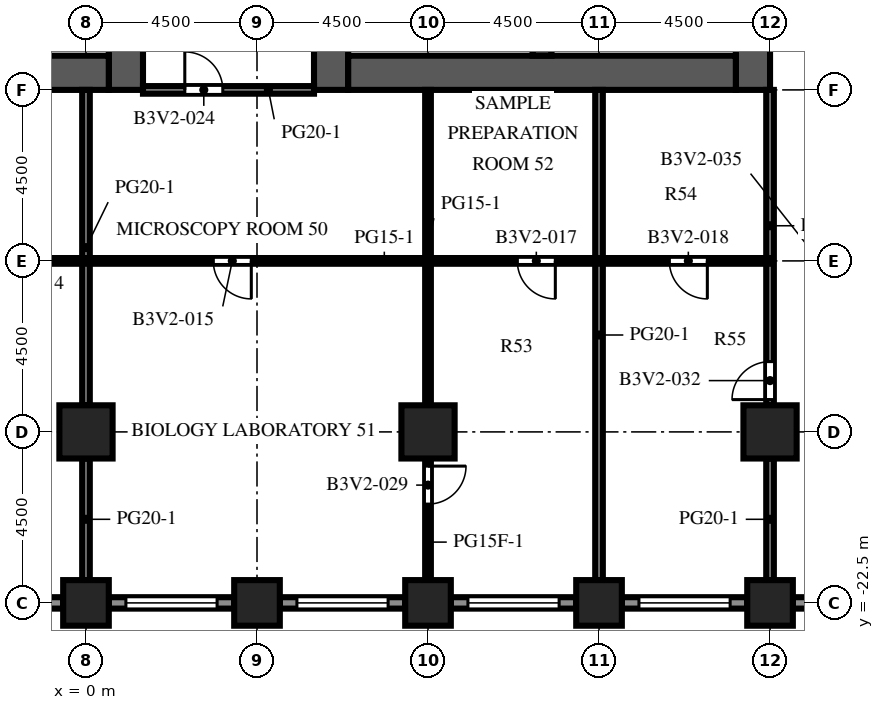
"""IFC4 building model, lengths in metres.
Left out: names, types, materials, properties, quantities, classifications, styles, units other than length and angle.
Written with IfcOpenShell. Run it as: python <this file> out.ifc"""

import sys

from ifc_helpers import new_model, si_unit, direction, frame, frame_2d, origin, origin_2d, place, context, subcontext, project, spatial, rectangle, extrude, element, fill, save


model = new_model("IFC4")
c1 = context("Model", 3, precision=1e-05, world=origin(), true_north=direction((0.0, 1.0)))
c2 = subcontext(c1, "Body", "Model", "MODEL_VIEW")
j1 = project(units=[si_unit("LENGTHUNIT", "METRE"), si_unit("PLANEANGLEUNIT", "RADIAN")], contexts=[c1])
p1 = place(None, origin())
s1 = spatial("IfcSite", under=j1, at=p1, CompositionType="ELEMENT")
p2 = place(p1, origin())
s2 = spatial("IfcBuilding", under=s1, at=p2, CompositionType="ELEMENT")
p3 = place(p2, frame((0.0, 0.0, 102.5)))
s3 = spatial("IfcBuildingStorey", under=s2, at=p3, CompositionType="ELEMENT", Elevation=102.5)
for number, where, z_axis, x_axis in (
    (1, (0.0, -22.5, 0.0), (0.0, 0.0, 1.0), (1.0, 0.0, 0.0)),
    (2, (4.5, -22.5, 0.0), (0.0, 0.0, 1.0), (1.0, 0.0, 0.0)),
    (3, (9.0, -22.5, 0.0), (0.0, 0.0, 1.0), (1.0, 0.0, 0.0)),
    (4, (13.5, -22.5, 0.0), (0.0, 0.0, 1.0), (1.0, 0.0, 0.0)),
    (5, (18.0, -22.5, 0.0), (0.0, 0.0, 1.0), (1.0, 0.0, 0.0)),
):
    element("IfcColumn", number, at=place(p3, frame(where, z_axis=z_axis, x_axis=x_axis)), inside=s3, PredefinedType="COLUMN", context=c2, shape_type="SweptSolid", body=[
        extrude(rectangle(XDim=1.2, YDim=1.2, at=origin_2d()), origin(), (0.0, 0.0, 1.0), 4.1),
    ])
for number, where, z_axis, x_axis in (
    (6, (0.0, -18.0, 0.0), (0.0, 0.0, 1.0), (1.0, 0.0, 0.0)),
    (7, (9.0, -18.0, 0.0), (0.0, 0.0, 1.0), (1.0, 0.0, 0.0)),
    (8, (18.0, -18.0, 0.0), (0.0, 0.0, 1.0), (1.0, 0.0, 0.0)),
):
    element("IfcColumn", number, at=place(p3, frame(where, z_axis=z_axis, x_axis=x_axis)), inside=s3, PredefinedType="COLUMN", context=c2, shape_type="SweptSolid", body=[
        extrude(rectangle(XDim=1.4, YDim=1.4, at=origin_2d()), origin(), (0.0, 0.0, 1.0), 4.1),
    ])
p4 = place(p3, frame((1.05, -9.0, 0.0), z_axis=(0.0, 0.0, 1.0), x_axis=(0.0, 1.0, 0.0)))
e9 = element("IfcWall", 9, at=p4, inside=s3, PredefinedType="SHEAR", context=c2, shape_type="SweptSolid", body=[
    extrude(rectangle(XDim=27.5, YDim=0.9, at=frame_2d((13.75, 0.0))), origin(), (0.0, 0.0, 1.0), 4.1),
])
p5 = place(p4, frame((12.55, 0.0, 0.0)))
e10 = element("IfcOpeningElement", 10, at=p5, cuts=e9, PredefinedType="OPENING", context=c2, shape_type="SweptSolid", body=[
    extrude(rectangle(XDim=2.4, YDim=2.4, at=frame_2d((1.2, 1.2))), frame((0.0, 0.46, 0.0), z_axis=(0.0, -1.0, 0.0), x_axis=(1.0, 0.0, 0.0)), (0.0, 0.0, 1.0), 0.92),
])
p6 = place(p4, frame((3.893, 0.0, 0.0)))
e11 = element("IfcOpeningElement", 11, at=p6, cuts=e9, PredefinedType="OPENING", context=c2, shape_type="SweptSolid", body=[
    extrude(rectangle(XDim=0.923, YDim=2.1, at=frame_2d((0.461, 1.05))), frame((0.0, 0.46, 0.0), z_axis=(0.0, -1.0, 0.0), x_axis=(1.0, 0.0, 0.0)), (0.0, 0.0, 1.0), 0.92),
])
p7 = place(p4, frame((23.427, 0.0, 0.0)))
e12 = element("IfcOpeningElement", 12, at=p7, cuts=e9, PredefinedType="OPENING", context=c2, shape_type="SweptSolid", body=[
    extrude(rectangle(XDim=1.2, YDim=2.1, at=frame_2d((0.6, 1.05))), frame((0.0, 0.46, 0.0), z_axis=(0.0, -1.0, 0.0), x_axis=(1.0, 0.0, 0.0)), (0.0, 0.0, 1.0), 0.92),
])
p8 = place(p3, frame((-9.6, -8.55, 0.0), z_axis=(0.0, 0.0, 1.0), x_axis=(1.0, 0.0, 0.0)))
e13 = element("IfcWall", 13, at=p8, inside=s3, PredefinedType="SHEAR", context=c2, shape_type="SweptSolid", body=[
    extrude(rectangle(XDim=10.2, YDim=0.9, at=frame_2d((5.1, 0.0))), origin(), (0.0, 0.0, 1.0), 4.1),
])
p9 = place(p3, frame((6.45, -9.0, 0.0), z_axis=(0.0, 0.0, 1.0), x_axis=(0.0, 1.0, 0.0)))
e14 = element("IfcWall", 14, at=p9, inside=s3, PredefinedType="SHEAR", context=c2, shape_type="SweptSolid", body=[
    extrude(rectangle(XDim=27.5, YDim=0.9, at=frame_2d((13.75, 0.0))), origin(), (0.0, 0.0, 1.0), 4.1),
])
p10 = place(p9, frame((12.55, 0.0, 0.0)))
e15 = element("IfcOpeningElement", 15, at=p10, cuts=e14, PredefinedType="OPENING", context=c2, shape_type="SweptSolid", body=[
    extrude(rectangle(XDim=2.4, YDim=2.4, at=frame_2d((1.2, 1.2))), frame((0.0, 0.46, 0.0), z_axis=(0.0, -1.0, 0.0), x_axis=(1.0, 0.0, 0.0)), (0.0, 0.0, 1.0), 0.92),
])
p11 = place(p9, frame((3.893, 0.0, 0.0)))
e16 = element("IfcOpeningElement", 16, at=p11, cuts=e14, PredefinedType="OPENING", context=c2, shape_type="SweptSolid", body=[
    extrude(rectangle(XDim=0.923, YDim=2.1, at=frame_2d((0.461, 1.05))), frame((0.0, 0.46, 0.0), z_axis=(0.0, -1.0, 0.0), x_axis=(1.0, 0.0, 0.0)), (0.0, 0.0, 1.0), 0.92),
])
p12 = place(p9, frame((23.427, 0.0, 0.0)))
e17 = element("IfcOpeningElement", 17, at=p12, cuts=e14, PredefinedType="OPENING", context=c2, shape_type="SweptSolid", body=[
    extrude(rectangle(XDim=1.2, YDim=2.1, at=frame_2d((0.6, 1.05))), frame((0.0, 0.46, 0.0), z_axis=(0.0, -1.0, 0.0), x_axis=(1.0, 0.0, 0.0)), (0.0, 0.0, 1.0), 0.92),
])
p13 = place(p3, frame((17.55, -9.0, 0.0), z_axis=(0.0, 0.0, 1.0), x_axis=(0.0, 1.0, 0.0)))
e18 = element("IfcWall", 18, at=p13, inside=s3, PredefinedType="SHEAR", context=c2, shape_type="SweptSolid", body=[
    extrude(rectangle(XDim=27.5, YDim=0.9, at=frame_2d((13.75, 0.0))), origin(), (0.0, 0.0, 1.0), 4.1),
])
p14 = place(p13, frame((12.55, 0.0, 0.0)))
e19 = element("IfcOpeningElement", 19, at=p14, cuts=e18, PredefinedType="OPENING", context=c2, shape_type="SweptSolid", body=[
    extrude(rectangle(XDim=2.4, YDim=2.4, at=frame_2d((1.2, 1.2))), frame((0.0, 0.46, 0.0), z_axis=(0.0, -1.0, 0.0), x_axis=(1.0, 0.0, 0.0)), (0.0, 0.0, 1.0), 0.92),
])
p15 = place(p13, frame((6.825, 0.0, 0.0)))
e20 = element("IfcOpeningElement", 20, at=p15, cuts=e18, PredefinedType="OPENING", context=c2, shape_type="SweptSolid", body=[
    extrude(rectangle(XDim=1.2, YDim=2.1, at=frame_2d((0.6, 1.05))), frame((0.0, 0.46, 0.0), z_axis=(0.0, -1.0, 0.0), x_axis=(1.0, 0.0, 0.0)), (0.0, 0.0, 1.0), 0.92),
])
p16 = place(p13, frame((19.475, 0.0, 0.0)))
e21 = element("IfcOpeningElement", 21, at=p16, cuts=e18, PredefinedType="OPENING", context=c2, shape_type="SweptSolid", body=[
    extrude(rectangle(XDim=1.2, YDim=2.1, at=frame_2d((0.6, 1.05))), frame((0.0, 0.46, 0.0), z_axis=(0.0, -1.0, 0.0), x_axis=(1.0, 0.0, 0.0)), (0.0, 0.0, 1.0), 0.92),
])
p17 = place(p3, frame((6.9, -8.55, 0.0), z_axis=(0.0, 0.0, 1.0), x_axis=(1.0, 0.0, 0.0)))
e22 = element("IfcWall", 22, at=p17, inside=s3, PredefinedType="SHEAR", context=c2, shape_type="SweptSolid", body=[
    extrude(rectangle(XDim=10.2, YDim=0.9, at=frame_2d((5.1, 0.0))), origin(), (0.0, 0.0, 1.0), 4.1),
])
p18 = place(p3, frame((12.0, -8.1, 0.0), z_axis=(0.0, 0.0, 1.0), x_axis=(0.0, 1.0, 0.0)))
e23 = element("IfcWall", 23, at=p18, inside=s3, PredefinedType="SHEAR", context=c2, shape_type="SweptSolid", body=[
    extrude(rectangle(XDim=7.35, YDim=0.5, at=frame_2d((3.675, 0.0))), origin(), (0.0, 0.0, 1.0), 4.1),
])
p19 = place(p3, frame((-0.6, -22.5, 0.0), z_axis=(0.0, 0.0, 1.0), x_axis=(-1.0, 0.0, 0.0)))
e24 = element("IfcWall", 24, at=p19, inside=s3, PredefinedType="SOLIDWALL", context=c2, shape_type="SweptSolid", body=[
    extrude(rectangle(XDim=3.3, YDim=0.3, at=frame_2d((1.65, 0.0))), origin(), (0.0, 0.0, 1.0), 2.75),
])
p20 = place(p19, frame((0.45, 0.0, 0.8)))
e25 = element("IfcOpeningElement", 25, at=p20, cuts=e24, PredefinedType="OPENING", context=c2, shape_type="SweptSolid", body=[
    extrude(rectangle(XDim=2.4, YDim=1.7, at=frame_2d((1.2, 0.85))), frame((0.0, 0.16, 0.0), z_axis=(0.0, -1.0, 0.0), x_axis=(1.0, 0.0, 0.0)), (0.0, 0.0, 1.0), 0.32),
])
p21 = place(p3, frame((3.9, -22.5, 0.0), z_axis=(0.0, 0.0, 1.0), x_axis=(-1.0, 0.0, 0.0)))
e26 = element("IfcWall", 26, at=p21, inside=s3, PredefinedType="SOLIDWALL", context=c2, shape_type="SweptSolid", body=[
    extrude(rectangle(XDim=3.3, YDim=0.3, at=frame_2d((1.65, 0.0))), origin(), (0.0, 0.0, 1.0), 2.75),
])
p22 = place(p21, frame((0.45, 0.0, 0.8)))
e27 = element("IfcOpeningElement", 27, at=p22, cuts=e26, PredefinedType="OPENING", context=c2, shape_type="SweptSolid", body=[
    extrude(rectangle(XDim=2.4, YDim=1.7, at=frame_2d((1.2, 0.85))), frame((0.0, 0.16, 0.0), z_axis=(0.0, -1.0, 0.0), x_axis=(1.0, 0.0, 0.0)), (0.0, 0.0, 1.0), 0.32),
])
p23 = place(p3, frame((8.4, -22.5, 0.0), z_axis=(0.0, 0.0, 1.0), x_axis=(-1.0, 0.0, 0.0)))
e28 = element("IfcWall", 28, at=p23, inside=s3, PredefinedType="SOLIDWALL", context=c2, shape_type="SweptSolid", body=[
    extrude(rectangle(XDim=3.3, YDim=0.3, at=frame_2d((1.65, 0.0))), origin(), (0.0, 0.0, 1.0), 2.75),
])
p24 = place(p23, frame((0.45, 0.0, 0.8)))
e29 = element("IfcOpeningElement", 29, at=p24, cuts=e28, PredefinedType="OPENING", context=c2, shape_type="SweptSolid", body=[
    extrude(rectangle(XDim=2.4, YDim=1.7, at=frame_2d((1.2, 0.85))), frame((0.0, 0.16, 0.0), z_axis=(0.0, -1.0, 0.0), x_axis=(1.0, 0.0, 0.0)), (0.0, 0.0, 1.0), 0.32),
])
p25 = place(p3, frame((12.9, -22.5, 0.0), z_axis=(0.0, 0.0, 1.0), x_axis=(-1.0, 0.0, 0.0)))
e30 = element("IfcWall", 30, at=p25, inside=s3, PredefinedType="SOLIDWALL", context=c2, shape_type="SweptSolid", body=[
    extrude(rectangle(XDim=3.3, YDim=0.3, at=frame_2d((1.65, 0.0))), origin(), (0.0, 0.0, 1.0), 2.75),
])
p26 = place(p25, frame((0.45, 0.0, 0.8)))
e31 = element("IfcOpeningElement", 31, at=p26, cuts=e30, PredefinedType="OPENING", context=c2, shape_type="SweptSolid", body=[
    extrude(rectangle(XDim=2.4, YDim=1.7, at=frame_2d((1.2, 0.85))), frame((0.0, 0.16, 0.0), z_axis=(0.0, -1.0, 0.0), x_axis=(1.0, 0.0, 0.0)), (0.0, 0.0, 1.0), 0.32),
])
p27 = place(p3, frame((17.4, -22.5, 0.0), z_axis=(0.0, 0.0, 1.0), x_axis=(-1.0, 0.0, 0.0)))
e32 = element("IfcWall", 32, at=p27, inside=s3, PredefinedType="SOLIDWALL", context=c2, shape_type="SweptSolid", body=[
    extrude(rectangle(XDim=3.3, YDim=0.3, at=frame_2d((1.65, 0.0))), origin(), (0.0, 0.0, 1.0), 2.75),
])
p28 = place(p27, frame((0.45, 0.0, 0.8)))
e33 = element("IfcOpeningElement", 33, at=p28, cuts=e32, PredefinedType="OPENING", context=c2, shape_type="SweptSolid", body=[
    extrude(rectangle(XDim=2.4, YDim=1.7, at=frame_2d((1.2, 0.85))), frame((0.0, 0.16, 0.0), z_axis=(0.0, -1.0, 0.0), x_axis=(1.0, 0.0, 0.0)), (0.0, 0.0, 1.0), 0.32),
])
p29 = place(p3, frame((21.9, -22.5, 0.0), z_axis=(0.0, 0.0, 1.0), x_axis=(-1.0, 0.0, 0.0)))
e34 = element("IfcWall", 34, at=p29, inside=s3, PredefinedType="SOLIDWALL", context=c2, shape_type="SweptSolid", body=[
    extrude(rectangle(XDim=3.3, YDim=0.3, at=frame_2d((1.65, 0.0))), origin(), (0.0, 0.0, 1.0), 2.75),
])
p30 = place(p29, frame((1.15, 0.0, 0.0)))
e35 = element("IfcOpeningElement", 35, at=p30, cuts=e34, PredefinedType="OPENING", context=c2, shape_type="SweptSolid", body=[
    extrude(rectangle(XDim=1.0, YDim=2.2, at=frame_2d((0.5, 1.1))), frame((0.0, 0.16, 0.0), z_axis=(0.0, -1.0, 0.0), x_axis=(1.0, 0.0, 0.0)), (0.0, 0.0, 1.0), 0.32),
])
p31 = place(p3, frame((0.0, -21.9, 0.0), z_axis=(0.0, 0.0, 1.0), x_axis=(0.0, 1.0, 0.0)))
e36 = element("IfcWall", 36, at=p31, inside=s3, PredefinedType="PARTITIONING", context=c2, shape_type="SweptSolid", body=[
    extrude(rectangle(XDim=3.2, YDim=0.2, at=frame_2d((1.6, 0.0))), origin(), (0.0, 0.0, 1.0), 3.65),
])
p32 = place(p3, frame((0.0, -17.3, 0.0), z_axis=(0.0, 0.0, 1.0), x_axis=(0.0, 1.0, 0.0)))
e37 = element("IfcWall", 37, at=p32, inside=s3, PredefinedType="PARTITIONING", context=c2, shape_type="SweptSolid", body=[
    extrude(rectangle(XDim=8.3, YDim=0.2, at=frame_2d((4.15, 0.0))), origin(), (0.0, 0.0, 1.0), 3.65),
])
p33 = place(p3, frame((9.0, -18.7, 0.0), z_axis=(0.0, 0.0, 1.0), x_axis=(0.0, -1.0, 0.0)))
e38 = element("IfcWall", 38, at=p33, inside=s3, PredefinedType="PARTITIONING", context=c2, shape_type="SweptSolid", body=[
    extrude(rectangle(XDim=3.2, YDim=0.15, at=frame_2d((1.6, 0.0))), origin(), (0.0, 0.0, 1.0), 3.65),
])
p34 = place(p33, frame((0.2, 0.0, 0.0)))
e39 = element("IfcOpeningElement", 39, at=p34, cuts=e38, PredefinedType="OPENING", context=c2, shape_type="SweptSolid", body=[
    extrude(rectangle(XDim=1.0, YDim=2.1, at=frame_2d((0.5, 1.05))), frame((0.0, 0.085, 0.0), z_axis=(0.0, -1.0, 0.0), x_axis=(1.0, 0.0, 0.0)), (0.0, 0.0, 1.0), 0.17),
])
p35 = place(p3, frame((9.0, -17.3, 0.0), z_axis=(0.0, 0.0, 1.0), x_axis=(0.0, 1.0, 0.0)))
e40 = element("IfcWall", 40, at=p35, inside=s3, PredefinedType="PARTITIONING", context=c2, shape_type="SweptSolid", body=[
    extrude(rectangle(XDim=8.3, YDim=0.15, at=frame_2d((4.15, 0.0))), origin(), (0.0, 0.0, 1.0), 3.65),
])
p36 = place(p3, frame((13.5, -21.9, 0.0), z_axis=(0.0, 0.0, 1.0), x_axis=(0.0, 1.0, 0.0)))
e41 = element("IfcWall", 41, at=p36, inside=s3, PredefinedType="PARTITIONING", context=c2, shape_type="SweptSolid", body=[
    extrude(rectangle(XDim=12.9, YDim=0.2, at=frame_2d((6.45, 0.0))), origin(), (0.0, 0.0, 1.0), 3.65),
])
p37 = place(p3, frame((18.0, -21.9, 0.0), z_axis=(0.0, 0.0, 1.0), x_axis=(0.0, 1.0, 0.0)))
e42 = element("IfcWall", 42, at=p37, inside=s3, PredefinedType="PARTITIONING", context=c2, shape_type="SweptSolid", body=[
    extrude(rectangle(XDim=3.2, YDim=0.2, at=frame_2d((1.6, 0.0))), origin(), (0.0, 0.0, 1.0), 3.65),
])
p38 = place(p3, frame((18.0, -17.3, 0.0), z_axis=(0.0, 0.0, 1.0), x_axis=(0.0, 1.0, 0.0)))
e43 = element("IfcWall", 43, at=p38, inside=s3, PredefinedType="PARTITIONING", context=c2, shape_type="SweptSolid", body=[
    extrude(rectangle(XDim=8.3, YDim=0.2, at=frame_2d((4.15, 0.0))), origin(), (0.0, 0.0, 1.0), 3.65),
])
p39 = place(p38, frame((0.15, 0.0, 0.0)))
e44 = element("IfcOpeningElement", 44, at=p39, cuts=e43, PredefinedType="OPENING", context=c2, shape_type="SweptSolid", body=[
    extrude(rectangle(XDim=1.0, YDim=2.1, at=frame_2d((0.5, 1.05))), frame((0.0, 0.11, 0.0), z_axis=(0.0, -1.0, 0.0), x_axis=(1.0, 0.0, 0.0)), (0.0, 0.0, 1.0), 0.22),
])
p40 = place(p3, frame((-10.5, -13.5, 0.0), z_axis=(0.0, 0.0, 1.0), x_axis=(1.0, 0.0, 0.0)))
e45 = element("IfcWall", 45, at=p40, inside=s3, PredefinedType="PARTITIONING", context=c2, shape_type="SweptSolid", body=[
    extrude(rectangle(XDim=28.5, YDim=0.15, at=frame_2d((14.25, 0.0))), origin(), (0.0, 0.0, 1.0), 3.65),
])
p41 = place(p40, frame((3.1, 0.0, 0.0)))
e46 = element("IfcOpeningElement", 46, at=p41, cuts=e45, PredefinedType="OPENING", context=c2, shape_type="SweptSolid", body=[
    extrude(rectangle(XDim=1.0, YDim=2.1, at=frame_2d((0.5, 1.05))), frame((0.0, 0.085, 0.0), z_axis=(0.0, -1.0, 0.0), x_axis=(1.0, 0.0, 0.0)), (0.0, 0.0, 1.0), 0.17),
])
p42 = place(p40, frame((8.35, 0.0, 0.0)))
e47 = element("IfcOpeningElement", 47, at=p42, cuts=e45, PredefinedType="OPENING", context=c2, shape_type="SweptSolid", body=[
    extrude(rectangle(XDim=1.0, YDim=2.1, at=frame_2d((0.5, 1.05))), frame((0.0, 0.085, 0.0), z_axis=(0.0, -1.0, 0.0), x_axis=(1.0, 0.0, 0.0)), (0.0, 0.0, 1.0), 0.17),
])
p43 = place(p40, frame((13.85, 0.0, 0.0)))
e48 = element("IfcOpeningElement", 48, at=p43, cuts=e45, PredefinedType="OPENING", context=c2, shape_type="SweptSolid", body=[
    extrude(rectangle(XDim=1.0, YDim=2.1, at=frame_2d((0.5, 1.05))), frame((0.0, 0.085, 0.0), z_axis=(0.0, -1.0, 0.0), x_axis=(1.0, 0.0, 0.0)), (0.0, 0.0, 1.0), 0.17),
])
p44 = place(p40, frame((21.85, 0.0, 0.0)))
e49 = element("IfcOpeningElement", 49, at=p44, cuts=e45, PredefinedType="OPENING", context=c2, shape_type="SweptSolid", body=[
    extrude(rectangle(XDim=1.0, YDim=2.1, at=frame_2d((0.5, 1.05))), frame((0.0, 0.085, 0.0), z_axis=(0.0, -1.0, 0.0), x_axis=(1.0, 0.0, 0.0)), (0.0, 0.0, 1.0), 0.17),
])
p45 = place(p40, frame((25.85, 0.0, 0.0)))
e50 = element("IfcOpeningElement", 50, at=p45, cuts=e45, PredefinedType="OPENING", context=c2, shape_type="SweptSolid", body=[
    extrude(rectangle(XDim=1.0, YDim=2.1, at=frame_2d((0.5, 1.05))), frame((0.0, 0.085, 0.0), z_axis=(0.0, -1.0, 0.0), x_axis=(1.0, 0.0, 0.0)), (0.0, 0.0, 1.0), 0.17),
])
p46 = place(p3, frame((6.0, -9.0, 0.0), z_axis=(0.0, 0.0, 1.0), x_axis=(-1.0, 0.0, 0.0)))
e51 = element("IfcWall", 51, at=p46, inside=s3, PredefinedType="PARTITIONING", context=c2, shape_type="SweptSolid", body=[
    extrude(rectangle(XDim=4.5, YDim=0.2, at=frame_2d((2.25, 0.0))), origin(), (0.0, 0.0, 1.0), 3.65),
])
p47 = place(p46, frame((2.4, 0.0, 0.0)))
e52 = element("IfcOpeningElement", 52, at=p47, cuts=e51, PredefinedType="OPENING", context=c2, shape_type="SweptSolid", body=[
    extrude(rectangle(XDim=1.0, YDim=2.1, at=frame_2d((0.5, 1.05))), frame((0.0, 0.11, 0.0), z_axis=(0.0, -1.0, 0.0), x_axis=(1.0, 0.0, 0.0)), (0.0, 0.0, 1.0), 0.22),
])
p48 = place(p22, origin())
e53 = element("IfcWindow", 53, at=p48, inside=s3, PartitioningType="SINGLE_PANEL", PredefinedType="WINDOW", context=c2, shape_type="SweptSolid", body=[
    extrude(rectangle(XDim=2.4, YDim=1.7, at=frame_2d((1.2, 0.85))), frame((0.0, 0.03, 0.0), z_axis=(0.0, -1.0, 0.0), x_axis=(1.0, 0.0, 0.0)), (0.0, 0.0, 1.0), 0.06),
])
fill(e27, e53)
p49 = place(p24, origin())
e54 = element("IfcWindow", 54, at=p49, inside=s3, PartitioningType="SINGLE_PANEL", PredefinedType="WINDOW", context=c2, shape_type="SweptSolid", body=[
    extrude(rectangle(XDim=2.4, YDim=1.7, at=frame_2d((1.2, 0.85))), frame((0.0, 0.03, 0.0), z_axis=(0.0, -1.0, 0.0), x_axis=(1.0, 0.0, 0.0)), (0.0, 0.0, 1.0), 0.06),
])
fill(e29, e54)
p50 = place(p26, origin())
e55 = element("IfcWindow", 55, at=p50, inside=s3, PartitioningType="SINGLE_PANEL", PredefinedType="WINDOW", context=c2, shape_type="SweptSolid", body=[
    extrude(rectangle(XDim=2.4, YDim=1.7, at=frame_2d((1.2, 0.85))), frame((0.0, 0.03, 0.0), z_axis=(0.0, -1.0, 0.0), x_axis=(1.0, 0.0, 0.0)), (0.0, 0.0, 1.0), 0.06),
])
fill(e31, e55)
p51 = place(p28, origin())
e56 = element("IfcWindow", 56, at=p51, inside=s3, PartitioningType="SINGLE_PANEL", PredefinedType="WINDOW", context=c2, shape_type="SweptSolid", body=[
    extrude(rectangle(XDim=2.4, YDim=1.7, at=frame_2d((1.2, 0.85))), frame((0.0, 0.03, 0.0), z_axis=(0.0, -1.0, 0.0), x_axis=(1.0, 0.0, 0.0)), (0.0, 0.0, 1.0), 0.06),
])
fill(e33, e56)
p52 = place(p43, origin())
e57 = element("IfcDoor", 57, at=p52, inside=s3, OperationType="SINGLE_SWING_RIGHT", PredefinedType="DOOR", context=c2, shape_type="SweptSolid", body=[
    extrude(rectangle(XDim=1.0, YDim=2.1, at=frame_2d((0.5, 1.05))), frame((0.0, 0.025, 0.0), z_axis=(0.0, -1.0, 0.0), x_axis=(1.0, 0.0, 0.0)), (0.0, 0.0, 1.0), 0.05),
])
fill(e48, e57)
p53 = place(p44, origin())
e58 = element("IfcDoor", 58, at=p53, inside=s3, OperationType="SINGLE_SWING_RIGHT", PredefinedType="DOOR", context=c2, shape_type="SweptSolid", body=[
    extrude(rectangle(XDim=1.0, YDim=2.1, at=frame_2d((0.5, 1.05))), frame((0.0, 0.025, 0.0), z_axis=(0.0, -1.0, 0.0), x_axis=(1.0, 0.0, 0.0)), (0.0, 0.0, 1.0), 0.05),
])
fill(e49, e58)
p54 = place(p45, origin())
e59 = element("IfcDoor", 59, at=p54, inside=s3, OperationType="SINGLE_SWING_RIGHT", PredefinedType="DOOR", context=c2, shape_type="SweptSolid", body=[
    extrude(rectangle(XDim=1.0, YDim=2.1, at=frame_2d((0.5, 1.05))), frame((0.0, 0.025, 0.0), z_axis=(0.0, -1.0, 0.0), x_axis=(1.0, 0.0, 0.0)), (0.0, 0.0, 1.0), 0.05),
])
fill(e50, e59)
p55 = place(p47, origin())
e60 = element("IfcDoor", 60, at=p55, inside=s3, OperationType="SINGLE_SWING_RIGHT", PredefinedType="DOOR", context=c2, shape_type="SweptSolid", body=[
    extrude(rectangle(XDim=1.0, YDim=2.1, at=frame_2d((0.5, 1.05))), frame((0.0, 0.025, 0.0), z_axis=(0.0, -1.0, 0.0), x_axis=(1.0, 0.0, 0.0)), (0.0, 0.0, 1.0), 0.05),
])
fill(e52, e60)
p56 = place(p34, origin())
e61 = element("IfcDoor", 61, at=p56, inside=s3, OperationType="SINGLE_SWING_LEFT", PredefinedType="DOOR", context=c2, shape_type="SweptSolid", body=[
    extrude(rectangle(XDim=1.0, YDim=2.1, at=frame_2d((0.5, 1.05))), frame((0.0, 0.025, 0.0), z_axis=(0.0, -1.0, 0.0), x_axis=(1.0, 0.0, 0.0)), (0.0, 0.0, 1.0), 0.05),
])
fill(e39, e61)
p57 = place(p39, origin())
e62 = element("IfcDoor", 62, at=p57, inside=s3, OperationType="SINGLE_SWING_LEFT", PredefinedType="DOOR", context=c2, shape_type="SweptSolid", body=[
    extrude(rectangle(XDim=1.0, YDim=2.1, at=frame_2d((0.5, 1.05))), frame((0.0, 0.025, 0.0), z_axis=(0.0, -1.0, 0.0), x_axis=(1.0, 0.0, 0.0)), (0.0, 0.0, 1.0), 0.05),
])
fill(e44, e62)
save(model, sys.argv[1])
